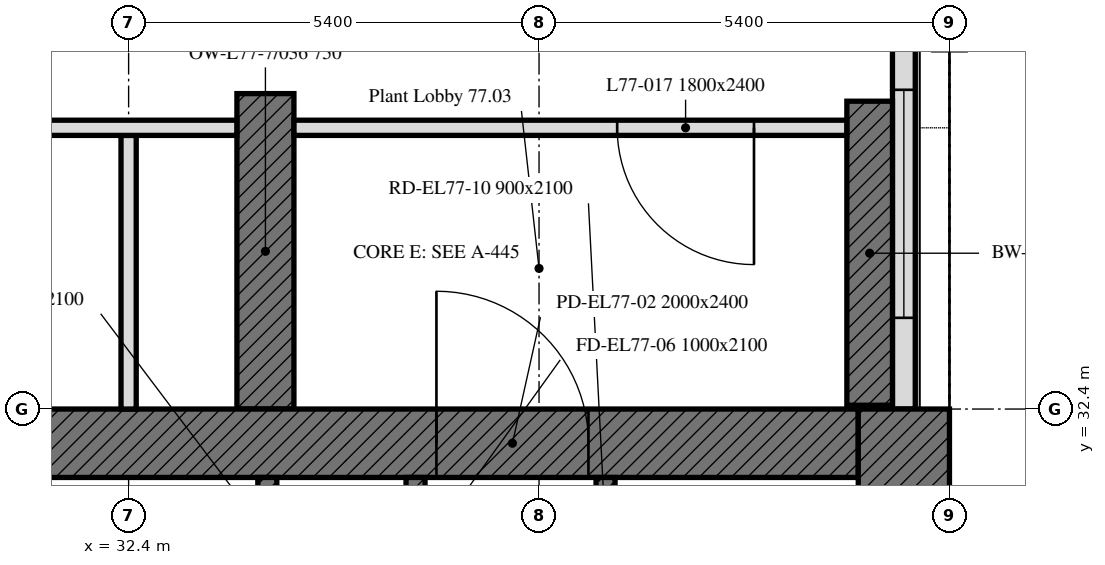
"""IFC4 building model, lengths in metres.
Left out: names, types, materials, properties, quantities, classifications, styles, units other than length and angle.
Written with IfcOpenShell. Run it as: python <this file> out.ifc"""

import sys

from ifc_helpers import new_model, si_unit, direction, frame, frame_2d, origin, place, context, subcontext, project, spatial, polyline, rectangle, outline, extrude, element, fill, save


model = new_model("IFC4")
c1 = context("Model", 3, precision=1e-05, world=origin(), true_north=direction((0.0, 1.0)))
c2 = subcontext(c1, "Body", "Model", "MODEL_VIEW")
j1 = project(units=[si_unit("LENGTHUNIT", "METRE"), si_unit("PLANEANGLEUNIT", "RADIAN")], contexts=[c1])
p1 = place(None, origin())
s1 = spatial("IfcSite", under=j1, at=p1, CompositionType="ELEMENT")
p2 = place(p1, origin())
s2 = spatial("IfcBuilding", under=s1, at=p2, CompositionType="ELEMENT")
p3 = place(p2, frame((0.0, 0.0, 308.2)))
s3 = spatial("IfcBuildingStorey", under=s2, at=p3, CompositionType="ELEMENT", Elevation=308.2)
p4 = place(p3, frame((42.15, 36.45, 0.0), z_axis=(0.0, 0.0, 1.0), x_axis=(0.0, -1.0, 0.0)))
e1 = element("IfcWall", 1, at=p4, inside=s3, PredefinedType="SHEAR", context=c2, shape_type="SweptSolid", body=[
    extrude(rectangle(XDim=4.0, YDim=0.6, at=frame_2d((2.0, 0.0))), origin(), (0.0, 0.0, 1.0), 4.2),
])
p5 = place(p3, frame((34.2, 32.4, 0.0), z_axis=(0.0, 0.0, 1.0), x_axis=(0.0, 1.0, 0.0)))
e2 = element("IfcWall", 2, at=p5, inside=s3, PredefinedType="SHEAR", context=c2, shape_type="SweptSolid", body=[
    extrude(rectangle(XDim=4.15, YDim=0.75, at=frame_2d((2.075, 0.0))), origin(), (0.0, 0.0, 1.0), 4.2),
])
p6 = place(p3, frame((42.6, 32.4, 0.0), z_axis=(0.0, 0.0, 1.0), x_axis=(0.0, 1.0, 0.0)))
e3 = element("IfcWall", 3, at=p6, inside=s3, PredefinedType="SOLIDWALL", context=c2, shape_type="SweptSolid", body=[
    extrude(outline(polyline([(0.0, 0.0), (10.614, 0.0), (10.614, 4.2), (10.024, 4.2), (9.434, 4.2), (8.845, 4.2), (8.255, 4.2), (7.665, 4.2), (7.076, 4.2), (6.486, 4.2), (5.896, 4.2), (5.307, 4.2), (4.717, 4.2), (4.127, 4.2), (3.538, 4.2), (2.948, 4.2), (2.359, 4.2), (1.769, 4.2), (1.179, 4.2), (0.59, 4.2), (0.0, 4.2), (0.0, 0.0)])), frame((0.0, 0.15, 0.0), z_axis=(0.0, -1.0, 0.0), x_axis=(1.0, 0.0, 0.0)), (0.0, 0.0, 1.0), 0.3),
])
p7 = place(p6, frame((1.2, 0.0, 0.6)))
e4 = element("IfcOpeningElement", 4, at=p7, cuts=e3, PredefinedType="OPENING", context=c2, shape_type="SweptSolid", body=[
    extrude(rectangle(XDim=3.0, YDim=1.8, at=frame_2d((1.5, 0.9))), frame((0.0, 0.16, 0.0), z_axis=(0.0, -1.0, 0.0), x_axis=(1.0, 0.0, 0.0)), (0.0, 0.0, 1.0), 0.32),
])
p8 = place(p6, frame((6.6, 0.0, 0.6)))
e5 = element("IfcOpeningElement", 5, at=p8, cuts=e3, PredefinedType="OPENING", context=c2, shape_type="SweptSolid", body=[
    extrude(rectangle(XDim=3.0, YDim=1.8, at=frame_2d((1.5, 0.9))), frame((0.0, 0.16, 0.0), z_axis=(0.0, -1.0, 0.0), x_axis=(1.0, 0.0, 0.0)), (0.0, 0.0, 1.0), 0.32),
])
p9 = place(p3, frame((30.9, 31.95, 0.0), z_axis=(0.0, 0.0, 1.0), x_axis=(1.0, 0.0, 0.0)))
e6 = element("IfcWall", 6, at=p9, inside=s3, PredefinedType="SOLIDWALL", context=c2, shape_type="SweptSolid", body=[
    extrude(rectangle(XDim=11.1, YDim=0.9, at=frame_2d((5.55, 0.0))), origin(), (0.0, 0.0, 1.0), 4.2),
])
p10 = place(p9, frame((5.55, 0.0, 0.0)))
e7 = element("IfcOpeningElement", 7, at=p10, cuts=e6, PredefinedType="OPENING", context=c2, shape_type="SweptSolid", body=[
    extrude(rectangle(XDim=2.0, YDim=2.4, at=frame_2d((1.0, 1.2))), frame((0.0, 0.45, 0.0), z_axis=(0.0, -1.0, 0.0), x_axis=(1.0, 0.0, 0.0)), (0.0, 0.0, 1.0), 0.9),
])
p11 = place(p3, frame((42.6, 32.4, 0.0), z_axis=(0.0, 0.0, 1.0), x_axis=(0.0, -1.0, 0.0)))
e8 = element("IfcWall", 8, at=p11, inside=s3, PredefinedType="SOLIDWALL", context=c2, shape_type="SweptSolid", body=[
    extrude(rectangle(XDim=16.2, YDim=1.2, at=frame_2d((8.1, 0.0))), origin(), (0.0, 0.0, 1.0), 4.2),
])
p12 = place(p3, frame((38.675, 17.1, 0.0), z_axis=(0.0, 0.0, 1.0), x_axis=(0.0, 1.0, 0.0)))
e9 = element("IfcWall", 9, at=p12, inside=s3, PredefinedType="SOLIDWALL", context=c2, shape_type="SweptSolid", body=[
    extrude(rectangle(XDim=14.4, YDim=0.25, at=frame_2d((7.2, 0.0))), origin(), (0.0, 0.0, 1.0), 4.2),
])
p13 = place(p12, frame((4.6, 0.0, 0.0)))
e10 = element("IfcOpeningElement", 10, at=p13, cuts=e9, PredefinedType="OPENING", context=c2, shape_type="SweptSolid", body=[
    extrude(rectangle(XDim=1.0, YDim=2.1, at=frame_2d((0.5, 1.05))), frame((0.0, 0.125, 0.0), z_axis=(0.0, -1.0, 0.0), x_axis=(1.0, 0.0, 0.0)), (0.0, 0.0, 1.0), 0.25),
])
p14 = place(p12, frame((7.062, 0.0, 0.0)))
e11 = element("IfcOpeningElement", 11, at=p14, cuts=e9, PredefinedType="OPENING", context=c2, shape_type="SweptSolid", body=[
    extrude(rectangle(XDim=1.2, YDim=2.1, at=frame_2d((0.6, 1.05))), frame((0.0, 0.125, 0.0), z_axis=(0.0, -1.0, 0.0), x_axis=(1.0, 0.0, 0.0)), (0.0, 0.0, 1.0), 0.25),
])
p15 = place(p12, frame((9.726, 0.0, 0.0)))
e12 = element("IfcOpeningElement", 12, at=p15, cuts=e9, PredefinedType="OPENING", context=c2, shape_type="SweptSolid", body=[
    extrude(rectangle(XDim=0.9, YDim=2.1, at=frame_2d((0.45, 1.05))), frame((0.0, 0.125, 0.0), z_axis=(0.0, -1.0, 0.0), x_axis=(1.0, 0.0, 0.0)), (0.0, 0.0, 1.0), 0.25),
])
p16 = place(p12, frame((11.539, 0.0, 0.0)))
e13 = element("IfcOpeningElement", 13, at=p16, cuts=e9, PredefinedType="OPENING", context=c2, shape_type="SweptSolid", body=[
    extrude(rectangle(XDim=0.9, YDim=2.1, at=frame_2d((0.45, 1.05))), frame((0.0, 0.125, 0.0), z_axis=(0.0, -1.0, 0.0), x_axis=(1.0, 0.0, 0.0)), (0.0, 0.0, 1.0), 0.25),
])
p17 = place(p12, frame((13.226, 0.0, 0.0)))
e14 = element("IfcOpeningElement", 14, at=p17, cuts=e9, PredefinedType="OPENING", context=c2, shape_type="SweptSolid", body=[
    extrude(rectangle(XDim=0.9, YDim=2.1, at=frame_2d((0.45, 1.05))), frame((0.0, 0.125, 0.0), z_axis=(0.0, -1.0, 0.0), x_axis=(1.0, 0.0, 0.0)), (0.0, 0.0, 1.0), 0.25),
])
p18 = place(p3, frame((34.225, 17.1, 0.0), z_axis=(0.0, 0.0, 1.0), x_axis=(0.0, 1.0, 0.0)))
e15 = element("IfcWall", 15, at=p18, inside=s3, PredefinedType="SOLIDWALL", context=c2, shape_type="SweptSolid", body=[
    extrude(rectangle(XDim=14.4, YDim=0.25, at=frame_2d((7.2, 0.0))), origin(), (0.0, 0.0, 1.0), 4.2),
])
p19 = place(p18, frame((13.15, 0.0, 0.0)))
e16 = element("IfcOpeningElement", 16, at=p19, cuts=e15, PredefinedType="OPENING", context=c2, shape_type="SweptSolid", body=[
    extrude(rectangle(XDim=1.0, YDim=2.1, at=frame_2d((0.5, 1.05))), frame((0.0, 0.125, 0.0), z_axis=(0.0, -1.0, 0.0), x_axis=(1.0, 0.0, 0.0)), (0.0, 0.0, 1.0), 0.25),
])
p20 = place(p18, frame((0.7, 0.0, 0.0)))
e17 = element("IfcOpeningElement", 17, at=p20, cuts=e15, PredefinedType="OPENING", context=c2, shape_type="SweptSolid", body=[
    extrude(rectangle(XDim=0.9, YDim=2.1, at=frame_2d((0.45, 1.05))), frame((0.0, 0.125, 0.0), z_axis=(0.0, -1.0, 0.0), x_axis=(1.0, 0.0, 0.0)), (0.0, 0.0, 1.0), 0.25),
])
p21 = place(p18, frame((6.175, 0.0, 0.0)))
e18 = element("IfcOpeningElement", 18, at=p21, cuts=e15, PredefinedType="OPENING", context=c2, shape_type="SweptSolid", body=[
    extrude(rectangle(XDim=0.9, YDim=2.1, at=frame_2d((0.45, 1.05))), frame((0.0, 0.125, 0.0), z_axis=(0.0, -1.0, 0.0), x_axis=(1.0, 0.0, 0.0)), (0.0, 0.0, 1.0), 0.25),
])
p22 = place(p3, frame((36.175, 29.4, 0.0), z_axis=(0.0, 0.0, 1.0), x_axis=(0.0, 1.0, 0.0)))
e19 = element("IfcWall", 19, at=p22, inside=s3, PredefinedType="SOLIDWALL", context=c2, shape_type="SweptSolid", body=[
    extrude(rectangle(XDim=2.1, YDim=0.25, at=frame_2d((1.05, 0.0))), origin(), (0.0, 0.0, 1.0), 4.2),
])
p23 = place(p22, frame((0.5, 0.0, 0.0)))
e20 = element("IfcOpeningElement", 20, at=p23, cuts=e19, PredefinedType="OPENING", context=c2, shape_type="SweptSolid", body=[
    extrude(rectangle(XDim=1.0, YDim=2.1, at=frame_2d((0.5, 1.05))), frame((0.0, 0.125, 0.0), z_axis=(0.0, -1.0, 0.0), x_axis=(1.0, 0.0, 0.0)), (0.0, 0.0, 1.0), 0.25),
])
p24 = place(p3, frame((32.4, 32.4, 0.0), z_axis=(0.0, 0.0, 1.0), x_axis=(0.0, 1.0, 0.0)))
e21 = element("IfcWall", 21, at=p24, inside=s3, PredefinedType="PARTITIONING", context=c2, shape_type="SweptSolid", body=[
    extrude(rectangle(XDim=3.6, YDim=0.2, at=frame_2d((1.8, 0.0))), origin(), (0.0, 0.0, 1.0), 3.45),
])
p25 = place(p3, frame((41.849, 36.1, 0.0), z_axis=(0.0, 0.0, 1.0), x_axis=(-1.0, 0.0, 0.0)))
e22 = element("IfcWall", 22, at=p25, inside=s3, PredefinedType="PARTITIONING", context=c2, shape_type="SweptSolid", body=[
    extrude(rectangle(XDim=7.273, YDim=0.2, at=frame_2d((3.637, 0.0))), origin(), (0.0, 0.0, 1.0), 4.2),
])
p26 = place(p25, frame((1.221, 0.0, 0.0)))
e23 = element("IfcOpeningElement", 23, at=p26, cuts=e22, PredefinedType="OPENING", context=c2, shape_type="SweptSolid", body=[
    extrude(rectangle(XDim=1.8, YDim=2.4, at=frame_2d((0.9, 1.2))), frame((0.0, 0.1, 0.0), z_axis=(0.0, -1.0, 0.0), x_axis=(1.0, 0.0, 0.0)), (0.0, 0.0, 1.0), 0.2),
])
p27 = place(p3, frame((33.824, 36.1, 0.0), z_axis=(0.0, 0.0, 1.0), x_axis=(-1.0, 0.0, 0.0)))
e24 = element("IfcWall", 24, at=p27, inside=s3, PredefinedType="PARTITIONING", context=c2, shape_type="SweptSolid", body=[
    extrude(rectangle(XDim=19.948, YDim=0.2, at=frame_2d((9.974, 0.0))), origin(), (0.0, 0.0, 1.0), 3.45),
])
p28 = place(p27, frame((3.641, 0.0, 0.0)))
e25 = element("IfcOpeningElement", 25, at=p28, cuts=e24, PredefinedType="OPENING", context=c2, shape_type="SweptSolid", body=[
    extrude(rectangle(XDim=1.0, YDim=2.1, at=frame_2d((0.5, 1.05))), frame((0.0, 0.1, 0.0), z_axis=(0.0, -1.0, 0.0), x_axis=(1.0, 0.0, 0.0)), (0.0, 0.0, 1.0), 0.2),
])
p29 = place(p27, frame((14.524, 0.0, 0.0)))
e26 = element("IfcOpeningElement", 26, at=p29, cuts=e24, PredefinedType="OPENING", context=c2, shape_type="SweptSolid", body=[
    extrude(rectangle(XDim=0.8, YDim=2.1, at=frame_2d((0.4, 1.05))), frame((0.0, 0.1, 0.0), z_axis=(0.0, -1.0, 0.0), x_axis=(1.0, 0.0, 0.0)), (0.0, 0.0, 1.0), 0.2),
])
p30 = place(p7, origin())
e27 = element("IfcWindow", 27, at=p30, inside=s3, PartitioningType="SINGLE_PANEL", PredefinedType="WINDOW", context=c2, shape_type="SweptSolid", body=[
    extrude(rectangle(XDim=3.0, YDim=1.8, at=frame_2d((1.5, 0.9))), frame((0.0, 0.03, 0.0), z_axis=(0.0, -1.0, 0.0), x_axis=(1.0, 0.0, 0.0)), (0.0, 0.0, 1.0), 0.06),
])
fill(e4, e27)
p31 = place(p10, origin())
e28 = element("IfcDoor", 28, at=p31, inside=s3, OperationType="DOUBLE_DOOR_SINGLE_SWING", PredefinedType="DOOR", context=c2, shape_type="SweptSolid", body=[
    extrude(rectangle(XDim=2.0, YDim=2.4, at=frame_2d((1.0, 1.2))), frame((0.0, 0.025, 0.0), z_axis=(0.0, -1.0, 0.0), x_axis=(1.0, 0.0, 0.0)), (0.0, 0.0, 1.0), 0.05),
])
fill(e7, e28)
p32 = place(p26, origin())
e29 = element("IfcDoor", 29, at=p32, inside=s3, OperationType="DOUBLE_DOOR_SINGLE_SWING", PredefinedType="DOOR", context=c2, shape_type="SweptSolid", body=[
    extrude(rectangle(XDim=1.8, YDim=2.4, at=frame_2d((0.9, 1.2))), frame((0.0, 0.025, 0.0), z_axis=(0.0, -1.0, 0.0), x_axis=(1.0, 0.0, 0.0)), (0.0, 0.0, 1.0), 0.05),
])
fill(e23, e29)
save(model, sys.argv[1])
